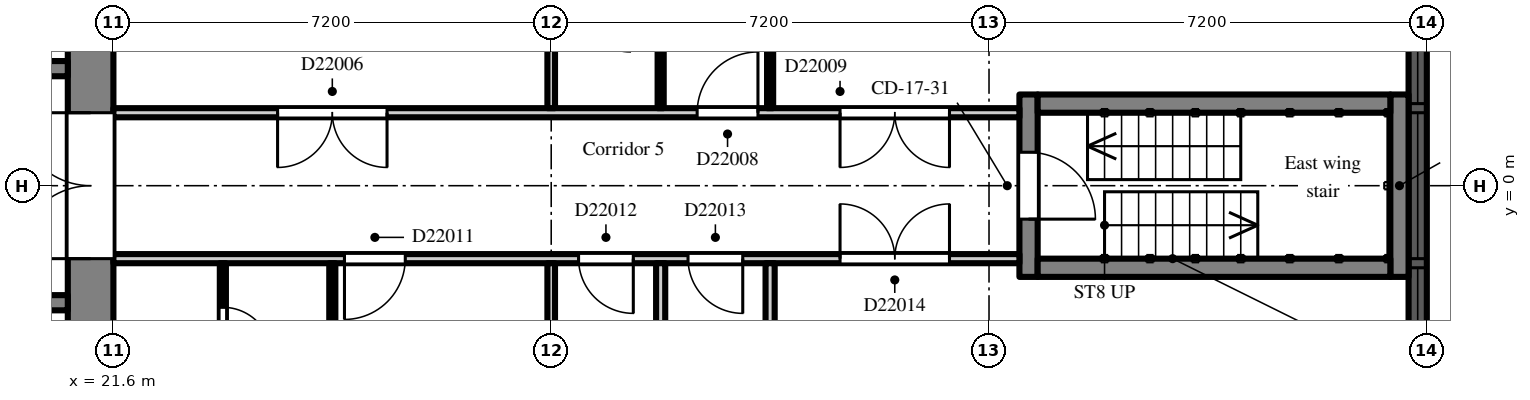
"""IFC4 building model, lengths in metres.
Left out: names, types, materials, properties, quantities, classifications, styles, units other than length and angle.
Written with IfcOpenShell. Run it as: python <this file> out.ifc"""

import sys

from ifc_helpers import new_model, si_unit, direction, frame, frame_2d, origin, place, context, subcontext, project, spatial, rectangle, extrude, element, fill, save


model = new_model("IFC4")
c1 = context("Model", 3, precision=1e-05, world=origin(), true_north=direction((0.0, 1.0)))
c2 = subcontext(c1, "Body", "Model", "MODEL_VIEW")
j1 = project(units=[si_unit("LENGTHUNIT", "METRE"), si_unit("PLANEANGLEUNIT", "RADIAN")], contexts=[c1])
p1 = place(None, origin())
s1 = spatial("IfcSite", under=j1, at=p1, CompositionType="ELEMENT")
p2 = place(p1, origin())
s2 = spatial("IfcBuilding", under=s1, at=p2, CompositionType="ELEMENT")
p3 = place(p2, frame((0.0, 0.0, 156.3)))
s3 = spatial("IfcBuildingStorey", under=s2, at=p3, CompositionType="ELEMENT", Elevation=156.3)
p4 = place(p3, frame((43.05, -2.7, 0.0), z_axis=(0.0, 0.0, 1.0), x_axis=(0.0, 1.0, 0.0)))
e1 = element("IfcWall", 1, at=p4, inside=s3, PredefinedType="SOLIDWALL", context=c2, shape_type="SweptSolid", body=[
    extrude(rectangle(XDim=5.4, YDim=0.3, at=frame_2d((2.7, 0.0))), origin(), (0.0, 0.0, 1.0), 2.2),
])
p5 = place(p4, frame((1.5, 0.0, 0.2)))
e2 = element("IfcOpeningElement", 2, at=p5, cuts=e1, PredefinedType="OPENING", context=c2, shape_type="SweptSolid", body=[
    extrude(rectangle(XDim=2.4, YDim=1.85, at=frame_2d((1.2, 0.925))), frame((0.0, 0.16, 0.0), z_axis=(0.0, -1.0, 0.0), x_axis=(1.0, 0.0, 0.0)), (0.0, 0.0, 1.0), 0.32),
])
p6 = place(p4, frame((0.15, 0.0, 0.2)))
e3 = element("IfcOpeningElement", 3, at=p6, cuts=e1, PredefinedType="OPENING", context=c2, shape_type="SweptSolid", body=[
    extrude(rectangle(XDim=1.2, YDim=1.85, at=frame_2d((0.6, 0.925))), frame((0.0, 0.16, 0.0), z_axis=(0.0, -1.0, 0.0), x_axis=(1.0, 0.0, 0.0)), (0.0, 0.0, 1.0), 0.32),
])
p7 = place(p4, frame((4.05, 0.0, 0.2)))
e4 = element("IfcOpeningElement", 4, at=p7, cuts=e1, PredefinedType="OPENING", context=c2, shape_type="SweptSolid", body=[
    extrude(rectangle(XDim=1.2, YDim=1.85, at=frame_2d((0.6, 0.925))), frame((0.0, 0.16, 0.0), z_axis=(0.0, -1.0, 0.0), x_axis=(1.0, 0.0, 0.0)), (0.0, 0.0, 1.0), 0.32),
])
p8 = place(p3, frame((21.225, -7.2, 0.0), z_axis=(0.0, 0.0, 1.0), x_axis=(0.0, 1.0, 0.0)))
e5 = element("IfcWall", 5, at=p8, inside=s3, PredefinedType="SHEAR", context=c2, shape_type="SweptSolid", body=[
    extrude(rectangle(XDim=14.4, YDim=0.75, at=frame_2d((7.2, 0.0))), origin(), (0.0, 0.0, 1.0), 2.6),
])
p9 = place(p8, frame((6.0, 0.0, 0.0)))
e6 = element("IfcOpeningElement", 6, at=p9, cuts=e5, PredefinedType="OPENING", context=c2, shape_type="SweptSolid", body=[
    extrude(rectangle(XDim=2.4, YDim=2.2, at=frame_2d((1.2, 1.1))), frame((0.0, 0.385, 0.0), z_axis=(0.0, -1.0, 0.0), x_axis=(1.0, 0.0, 0.0)), (0.0, 0.0, 1.0), 0.77),
])
p10 = place(p3, frame((7.9, 1.925, 0.0), z_axis=(0.0, 0.0, 1.0), x_axis=(1.0, 0.0, 0.0)))
e7 = element("IfcWall", 7, at=p10, inside=s3, PredefinedType="SHEAR", context=c2, shape_type="SweptSolid", body=[
    extrude(rectangle(XDim=12.95, YDim=0.25, at=frame_2d((6.475, 0.0))), origin(), (0.0, 0.0, 1.0), 2.6),
])
p11 = place(p10, frame((4.825, 0.0, 0.0)))
e8 = element("IfcOpeningElement", 8, at=p11, cuts=e7, PredefinedType="OPENING", context=c2, shape_type="SweptSolid", body=[
    extrude(rectangle(XDim=1.1, YDim=2.1, at=frame_2d((0.55, 1.05))), frame((0.0, 0.135, 0.0), z_axis=(0.0, -1.0, 0.0), x_axis=(1.0, 0.0, 0.0)), (0.0, 0.0, 1.0), 0.27),
])
p12 = place(p10, frame((7.025, 0.0, 0.0)))
e9 = element("IfcOpeningElement", 9, at=p12, cuts=e7, PredefinedType="OPENING", context=c2, shape_type="SweptSolid", body=[
    extrude(rectangle(XDim=1.1, YDim=2.1, at=frame_2d((0.55, 1.05))), frame((0.0, 0.135, 0.0), z_axis=(0.0, -1.0, 0.0), x_axis=(1.0, 0.0, 0.0)), (0.0, 0.0, 1.0), 0.27),
])
p13 = place(p10, frame((9.225, 0.0, 0.0)))
e10 = element("IfcOpeningElement", 10, at=p13, cuts=e7, PredefinedType="OPENING", context=c2, shape_type="SweptSolid", body=[
    extrude(rectangle(XDim=1.1, YDim=2.1, at=frame_2d((0.55, 1.05))), frame((0.0, 0.135, 0.0), z_axis=(0.0, -1.0, 0.0), x_axis=(1.0, 0.0, 0.0)), (0.0, 0.0, 1.0), 0.27),
])
p14 = place(p10, frame((0.525, 0.0, 0.0)))
e11 = element("IfcOpeningElement", 11, at=p14, cuts=e7, PredefinedType="OPENING", context=c2, shape_type="SweptSolid", body=[
    extrude(rectangle(XDim=0.9, YDim=2.1, at=frame_2d((0.45, 1.05))), frame((0.0, 0.135, 0.0), z_axis=(0.0, -1.0, 0.0), x_axis=(1.0, 0.0, 0.0)), (0.0, 0.0, 1.0), 0.27),
])
p15 = place(p10, frame((2.625, 0.0, 0.0)))
e12 = element("IfcOpeningElement", 12, at=p15, cuts=e7, PredefinedType="OPENING", context=c2, shape_type="SweptSolid", body=[
    extrude(rectangle(XDim=1.1, YDim=2.1, at=frame_2d((0.55, 1.05))), frame((0.0, 0.135, 0.0), z_axis=(0.0, -1.0, 0.0), x_axis=(1.0, 0.0, 0.0)), (0.0, 0.0, 1.0), 0.27),
])
p16 = place(p10, frame((11.525, 0.0, 0.0)))
e13 = element("IfcOpeningElement", 13, at=p16, cuts=e7, PredefinedType="OPENING", context=c2, shape_type="SweptSolid", body=[
    extrude(rectangle(XDim=0.9, YDim=2.1, at=frame_2d((0.45, 1.05))), frame((0.0, 0.135, 0.0), z_axis=(0.0, -1.0, 0.0), x_axis=(1.0, 0.0, 0.0)), (0.0, 0.0, 1.0), 0.27),
])
p17 = place(p3, frame((7.9, -1.925, 0.0), z_axis=(0.0, 0.0, 1.0), x_axis=(1.0, 0.0, 0.0)))
e14 = element("IfcWall", 14, at=p17, inside=s3, PredefinedType="SHEAR", context=c2, shape_type="SweptSolid", body=[
    extrude(rectangle(XDim=12.95, YDim=0.25, at=frame_2d((6.475, 0.0))), origin(), (0.0, 0.0, 1.0), 2.6),
])
p18 = place(p17, frame((0.525, 0.0, 0.0)))
e15 = element("IfcOpeningElement", 15, at=p18, cuts=e14, PredefinedType="OPENING", context=c2, shape_type="SweptSolid", body=[
    extrude(rectangle(XDim=0.9, YDim=2.1, at=frame_2d((0.45, 1.05))), frame((0.0, 0.135, 0.0), z_axis=(0.0, -1.0, 0.0), x_axis=(1.0, 0.0, 0.0)), (0.0, 0.0, 1.0), 0.27),
])
p19 = place(p17, frame((2.625, 0.0, 0.0)))
e16 = element("IfcOpeningElement", 16, at=p19, cuts=e14, PredefinedType="OPENING", context=c2, shape_type="SweptSolid", body=[
    extrude(rectangle(XDim=1.1, YDim=2.1, at=frame_2d((0.55, 1.05))), frame((0.0, 0.135, 0.0), z_axis=(0.0, -1.0, 0.0), x_axis=(1.0, 0.0, 0.0)), (0.0, 0.0, 1.0), 0.27),
])
p20 = place(p17, frame((8.225, 0.0, 0.0)))
e17 = element("IfcOpeningElement", 17, at=p20, cuts=e14, PredefinedType="OPENING", context=c2, shape_type="SweptSolid", body=[
    extrude(rectangle(XDim=0.9, YDim=2.1, at=frame_2d((0.45, 1.05))), frame((0.0, 0.135, 0.0), z_axis=(0.0, -1.0, 0.0), x_axis=(1.0, 0.0, 0.0)), (0.0, 0.0, 1.0), 0.27),
])
p21 = place(p3, frame((36.65, -1.5, 0.0), z_axis=(0.0, 0.0, 1.0), x_axis=(0.0, 1.0, 0.0)))
e18 = element("IfcWall", 18, at=p21, inside=s3, PredefinedType="SHEAR", context=c2, shape_type="SweptSolid", body=[
    extrude(rectangle(XDim=3.0, YDim=0.3, at=frame_2d((1.5, 0.0))), origin(), (0.0, 0.0, 1.0), 2.6),
])
p22 = place(p21, frame((0.95, 0.0, 0.0)))
e19 = element("IfcOpeningElement", 19, at=p22, cuts=e18, PredefinedType="OPENING", context=c2, shape_type="SweptSolid", body=[
    extrude(rectangle(XDim=1.1, YDim=2.1, at=frame_2d((0.55, 1.05))), frame((0.0, 0.16, 0.0), z_axis=(0.0, -1.0, 0.0), x_axis=(1.0, 0.0, 0.0)), (0.0, 0.0, 1.0), 0.32),
])
p23 = place(p3, frame((42.75, -1.5, 0.0), z_axis=(0.0, 0.0, 1.0), x_axis=(0.0, 1.0, 0.0)))
e20 = element("IfcWall", 20, at=p23, inside=s3, PredefinedType="SHEAR", context=c2, shape_type="SweptSolid", body=[
    extrude(rectangle(XDim=3.0, YDim=0.3, at=frame_2d((1.5, 0.0))), origin(), (0.0, 0.0, 1.0), 2.6),
])
for number, where, z_axis, x_axis in (
    (21, (36.8, -1.35, 0.0), (0.0, 0.0, 1.0), (1.0, 0.0, 0.0)),
    (22, (36.8, 1.35, 0.0), (0.0, 0.0, 1.0), (1.0, 0.0, 0.0)),
):
    element("IfcWall", number, at=place(p3, frame(where, z_axis=z_axis, x_axis=x_axis)), inside=s3, PredefinedType="SHEAR", context=c2, shape_type="SweptSolid", body=[
        extrude(rectangle(XDim=5.8, YDim=0.3, at=frame_2d((2.9, 0.0))), origin(), (0.0, 0.0, 1.0), 2.6),
    ])
p24 = place(p3, frame((21.6, -1.2, 0.0), z_axis=(0.0, 0.0, 1.0), x_axis=(1.0, 0.0, 0.0)))
e23 = element("IfcWall", 23, at=p24, inside=s3, PredefinedType="PARTITIONING", context=c2, shape_type="SweptSolid", body=[
    extrude(rectangle(XDim=14.9, YDim=0.15, at=frame_2d((7.45, 0.0))), origin(), (0.0, 0.0, 1.0), 2.6),
])
p25 = place(p24, frame((3.8, 0.0, 0.0)))
e24 = element("IfcOpeningElement", 24, at=p25, cuts=e23, PredefinedType="OPENING", context=c2, shape_type="SweptSolid", body=[
    extrude(rectangle(XDim=1.0, YDim=2.1, at=frame_2d((0.5, 1.05))), frame((0.0, 0.085, 0.0), z_axis=(0.0, -1.0, 0.0), x_axis=(1.0, 0.0, 0.0)), (0.0, 0.0, 1.0), 0.17),
])
p26 = place(p24, frame((7.65, 0.0, 0.0)))
e25 = element("IfcOpeningElement", 25, at=p26, cuts=e23, PredefinedType="OPENING", context=c2, shape_type="SweptSolid", body=[
    extrude(rectangle(XDim=0.9, YDim=2.1, at=frame_2d((0.45, 1.05))), frame((0.0, 0.085, 0.0), z_axis=(0.0, -1.0, 0.0), x_axis=(1.0, 0.0, 0.0)), (0.0, 0.0, 1.0), 0.17),
])
p27 = place(p24, frame((9.45, 0.0, 0.0)))
e26 = element("IfcOpeningElement", 26, at=p27, cuts=e23, PredefinedType="OPENING", context=c2, shape_type="SweptSolid", body=[
    extrude(rectangle(XDim=0.9, YDim=2.1, at=frame_2d((0.45, 1.05))), frame((0.0, 0.085, 0.0), z_axis=(0.0, -1.0, 0.0), x_axis=(1.0, 0.0, 0.0)), (0.0, 0.0, 1.0), 0.17),
])
p28 = place(p24, frame((11.95, 0.0, 0.0)))
e27 = element("IfcOpeningElement", 27, at=p28, cuts=e23, PredefinedType="OPENING", context=c2, shape_type="SweptSolid", body=[
    extrude(rectangle(XDim=1.8, YDim=2.1, at=frame_2d((0.9, 1.05))), frame((0.0, 0.085, 0.0), z_axis=(0.0, -1.0, 0.0), x_axis=(1.0, 0.0, 0.0)), (0.0, 0.0, 1.0), 0.17),
])
p29 = place(p3, frame((21.6, 1.2, 0.0), z_axis=(0.0, 0.0, 1.0), x_axis=(1.0, 0.0, 0.0)))
e28 = element("IfcWall", 28, at=p29, inside=s3, PredefinedType="PARTITIONING", context=c2, shape_type="SweptSolid", body=[
    extrude(rectangle(XDim=14.9, YDim=0.15, at=frame_2d((7.45, 0.0))), origin(), (0.0, 0.0, 1.0), 2.6),
])
p30 = place(p29, frame((2.7, 0.0, 0.0)))
e29 = element("IfcOpeningElement", 29, at=p30, cuts=e28, PredefinedType="OPENING", context=c2, shape_type="SweptSolid", body=[
    extrude(rectangle(XDim=1.8, YDim=2.1, at=frame_2d((0.9, 1.05))), frame((0.0, 0.085, 0.0), z_axis=(0.0, -1.0, 0.0), x_axis=(1.0, 0.0, 0.0)), (0.0, 0.0, 1.0), 0.17),
])
p31 = place(p29, frame((9.6, 0.0, 0.0)))
e30 = element("IfcOpeningElement", 30, at=p31, cuts=e28, PredefinedType="OPENING", context=c2, shape_type="SweptSolid", body=[
    extrude(rectangle(XDim=1.0, YDim=2.1, at=frame_2d((0.5, 1.05))), frame((0.0, 0.085, 0.0), z_axis=(0.0, -1.0, 0.0), x_axis=(1.0, 0.0, 0.0)), (0.0, 0.0, 1.0), 0.17),
])
p32 = place(p29, frame((11.95, 0.0, 0.0)))
e31 = element("IfcOpeningElement", 31, at=p32, cuts=e28, PredefinedType="OPENING", context=c2, shape_type="SweptSolid", body=[
    extrude(rectangle(XDim=1.8, YDim=2.1, at=frame_2d((0.9, 1.05))), frame((0.0, 0.085, 0.0), z_axis=(0.0, -1.0, 0.0), x_axis=(1.0, 0.0, 0.0)), (0.0, 0.0, 1.0), 0.17),
])
p33 = place(p3, frame((23.4, -3.65, 0.0), z_axis=(0.0, 0.0, 1.0), x_axis=(0.0, 1.0, 0.0)))
e32 = element("IfcWall", 32, at=p33, inside=s3, PredefinedType="PARTITIONING", context=c2, shape_type="SweptSolid", body=[
    extrude(rectangle(XDim=2.375, YDim=0.1, at=frame_2d((1.188, 0.0))), origin(), (0.0, 0.0, 1.0), 2.6),
])
p34 = place(p33, frame((0.85, 0.0, 0.0)))
e33 = element("IfcOpeningElement", 33, at=p34, cuts=e32, PredefinedType="OPENING", context=c2, shape_type="SweptSolid", body=[
    extrude(rectangle(XDim=0.8, YDim=2.1, at=frame_2d((0.4, 1.05))), frame((0.0, 0.06, 0.0), z_axis=(0.0, -1.0, 0.0), x_axis=(1.0, 0.0, 0.0)), (0.0, 0.0, 1.0), 0.12),
])
p35 = place(p3, frame((25.2, -3.55, 0.0), z_axis=(0.0, 0.0, 1.0), x_axis=(0.0, 1.0, 0.0)))
e34 = element("IfcWall", 34, at=p35, inside=s3, PredefinedType="PARTITIONING", context=c2, shape_type="SweptSolid", body=[
    extrude(rectangle(XDim=2.275, YDim=0.1, at=frame_2d((1.138, 0.0))), origin(), (0.0, 0.0, 1.0), 2.6),
])
p36 = place(p3, frame((28.8, -6.9, 0.0), z_axis=(0.0, 0.0, 1.0), x_axis=(0.0, 1.0, 0.0)))
e35 = element("IfcWall", 35, at=p36, inside=s3, PredefinedType="PARTITIONING", context=c2, shape_type="SweptSolid", body=[
    extrude(rectangle(XDim=5.625, YDim=0.125, at=frame_2d((2.812, 0.0))), origin(), (0.0, 0.0, 1.0), 2.6),
])
p37 = place(p3, frame((28.8, 1.275, 0.0), z_axis=(0.0, 0.0, 1.0), x_axis=(0.0, 1.0, 0.0)))
e36 = element("IfcWall", 36, at=p37, inside=s3, PredefinedType="PARTITIONING", context=c2, shape_type="SweptSolid", body=[
    extrude(rectangle(XDim=1.725, YDim=0.125, at=frame_2d((0.863, 0.0))), origin(), (0.0, 0.0, 1.0), 2.6),
])
p38 = place(p3, frame((30.6, -6.9, 0.0), z_axis=(0.0, 0.0, 1.0), x_axis=(0.0, 1.0, 0.0)))
e37 = element("IfcWall", 37, at=p38, inside=s3, PredefinedType="PARTITIONING", context=c2, shape_type="SweptSolid", body=[
    extrude(rectangle(XDim=5.625, YDim=0.15, at=frame_2d((2.812, 0.0))), origin(), (0.0, 0.0, 1.0), 2.6),
])
p39 = place(p3, frame((30.6, 1.275, 0.0), z_axis=(0.0, 0.0, 1.0), x_axis=(0.0, 1.0, 0.0)))
e38 = element("IfcWall", 38, at=p39, inside=s3, PredefinedType="PARTITIONING", context=c2, shape_type="SweptSolid", body=[
    extrude(rectangle(XDim=1.675, YDim=0.1, at=frame_2d((0.837, 0.0))), origin(), (0.0, 0.0, 1.0), 2.6),
])
p40 = place(p3, frame((32.4, -6.9, 0.0), z_axis=(0.0, 0.0, 1.0), x_axis=(0.0, 1.0, 0.0)))
e39 = element("IfcWall", 39, at=p40, inside=s3, PredefinedType="PARTITIONING", context=c2, shape_type="SweptSolid", body=[
    extrude(rectangle(XDim=5.625, YDim=0.15, at=frame_2d((2.812, 0.0))), origin(), (0.0, 0.0, 1.0), 2.6),
])
p41 = place(p3, frame((32.4, 1.275, 0.0), z_axis=(0.0, 0.0, 1.0), x_axis=(0.0, 1.0, 0.0)))
e40 = element("IfcWall", 40, at=p41, inside=s3, PredefinedType="PARTITIONING", context=c2, shape_type="SweptSolid", body=[
    extrude(rectangle(XDim=5.625, YDim=0.1, at=frame_2d((2.812, 0.0))), origin(), (0.0, 0.0, 1.0), 2.6),
])
p42 = place(p5, origin())
e41 = element("IfcWindow", 41, at=p42, inside=s3, PartitioningType="SINGLE_PANEL", PredefinedType="WINDOW", context=c2, shape_type="SweptSolid", body=[
    extrude(rectangle(XDim=2.4, YDim=1.85, at=frame_2d((1.2, 0.925))), frame((0.0, 0.03, 0.0), z_axis=(0.0, -1.0, 0.0), x_axis=(1.0, 0.0, 0.0)), (0.0, 0.0, 1.0), 0.06),
])
fill(e2, e41)
p43 = place(p6, origin())
e42 = element("IfcWindow", 42, at=p43, inside=s3, PartitioningType="SINGLE_PANEL", PredefinedType="WINDOW", context=c2, shape_type="SweptSolid", body=[
    extrude(rectangle(XDim=1.2, YDim=1.85, at=frame_2d((0.6, 0.925))), frame((0.0, 0.03, 0.0), z_axis=(0.0, -1.0, 0.0), x_axis=(1.0, 0.0, 0.0)), (0.0, 0.0, 1.0), 0.06),
])
fill(e3, e42)
p44 = place(p7, origin())
e43 = element("IfcWindow", 43, at=p44, inside=s3, PartitioningType="SINGLE_PANEL", PredefinedType="WINDOW", context=c2, shape_type="SweptSolid", body=[
    extrude(rectangle(XDim=1.2, YDim=1.85, at=frame_2d((0.6, 0.925))), frame((0.0, 0.03, 0.0), z_axis=(0.0, -1.0, 0.0), x_axis=(1.0, 0.0, 0.0)), (0.0, 0.0, 1.0), 0.06),
])
fill(e4, e43)
p45 = place(p9, origin())
e44 = element("IfcDoor", 44, at=p45, inside=s3, OperationType="DOUBLE_DOOR_DOUBLE_SWING", PredefinedType="DOOR", context=c2, shape_type="SweptSolid", body=[
    extrude(rectangle(XDim=2.4, YDim=2.2, at=frame_2d((1.2, 1.1))), frame((0.0, 0.025, 0.0), z_axis=(0.0, -1.0, 0.0), x_axis=(1.0, 0.0, 0.0)), (0.0, 0.0, 1.0), 0.05),
])
fill(e6, e44)
p46 = place(p22, frame((1.1, 0.0, 0.0), z_axis=(0.0, 0.0, 1.0), x_axis=(-1.0, 0.0, 0.0)))
e45 = element("IfcDoor", 45, at=p46, inside=s3, OperationType="SINGLE_SWING_RIGHT", PredefinedType="DOOR", context=c2, shape_type="SweptSolid", body=[
    extrude(rectangle(XDim=1.1, YDim=2.1, at=frame_2d((0.55, 1.05))), frame((0.0, 0.025, 0.0), z_axis=(0.0, -1.0, 0.0), x_axis=(1.0, 0.0, 0.0)), (0.0, 0.0, 1.0), 0.05),
])
fill(e19, e45)
p47 = place(p30, frame((1.8, 0.0, 0.0), z_axis=(0.0, 0.0, 1.0), x_axis=(-1.0, 0.0, 0.0)))
e46 = element("IfcDoor", 46, at=p47, inside=s3, OperationType="DOUBLE_DOOR_DOUBLE_SWING", PredefinedType="DOOR", context=c2, shape_type="SweptSolid", body=[
    extrude(rectangle(XDim=1.8, YDim=2.1, at=frame_2d((0.9, 1.05))), frame((0.0, 0.025, 0.0), z_axis=(0.0, -1.0, 0.0), x_axis=(1.0, 0.0, 0.0)), (0.0, 0.0, 1.0), 0.05),
])
fill(e29, e46)
p48 = place(p31, origin())
e47 = element("IfcDoor", 47, at=p48, inside=s3, OperationType="SINGLE_SWING_RIGHT", PredefinedType="DOOR", context=c2, shape_type="SweptSolid", body=[
    extrude(rectangle(XDim=1.0, YDim=2.1, at=frame_2d((0.5, 1.05))), frame((0.0, 0.025, 0.0), z_axis=(0.0, -1.0, 0.0), x_axis=(1.0, 0.0, 0.0)), (0.0, 0.0, 1.0), 0.05),
])
fill(e30, e47)
p49 = place(p32, frame((1.8, 0.0, 0.0), z_axis=(0.0, 0.0, 1.0), x_axis=(-1.0, 0.0, 0.0)))
e48 = element("IfcDoor", 48, at=p49, inside=s3, OperationType="DOUBLE_DOOR_DOUBLE_SWING", PredefinedType="DOOR", context=c2, shape_type="SweptSolid", body=[
    extrude(rectangle(XDim=1.8, YDim=2.1, at=frame_2d((0.9, 1.05))), frame((0.0, 0.025, 0.0), z_axis=(0.0, -1.0, 0.0), x_axis=(1.0, 0.0, 0.0)), (0.0, 0.0, 1.0), 0.05),
])
fill(e31, e48)
p50 = place(p34, frame((0.8, 0.0, 0.0), z_axis=(0.0, 0.0, 1.0), x_axis=(-1.0, 0.0, 0.0)))
e49 = element("IfcDoor", 49, at=p50, inside=s3, OperationType="SINGLE_SWING_RIGHT", PredefinedType="DOOR", context=c2, shape_type="SweptSolid", body=[
    extrude(rectangle(XDim=0.8, YDim=2.1, at=frame_2d((0.4, 1.05))), frame((0.0, 0.025, 0.0), z_axis=(0.0, -1.0, 0.0), x_axis=(1.0, 0.0, 0.0)), (0.0, 0.0, 1.0), 0.05),
])
fill(e33, e49)
p51 = place(p25, frame((1.0, 0.0, 0.0), z_axis=(0.0, 0.0, 1.0), x_axis=(-1.0, 0.0, 0.0)))
e50 = element("IfcDoor", 50, at=p51, inside=s3, OperationType="SINGLE_SWING_RIGHT", PredefinedType="DOOR", context=c2, shape_type="SweptSolid", body=[
    extrude(rectangle(XDim=1.0, YDim=2.1, at=frame_2d((0.5, 1.05))), frame((0.0, 0.025, 0.0), z_axis=(0.0, -1.0, 0.0), x_axis=(1.0, 0.0, 0.0)), (0.0, 0.0, 1.0), 0.05),
])
fill(e24, e50)
p52 = place(p26, frame((0.9, 0.0, 0.0), z_axis=(0.0, 0.0, 1.0), x_axis=(-1.0, 0.0, 0.0)))
e51 = element("IfcDoor", 51, at=p52, inside=s3, OperationType="SINGLE_SWING_LEFT", PredefinedType="DOOR", context=c2, shape_type="SweptSolid", body=[
    extrude(rectangle(XDim=0.9, YDim=2.1, at=frame_2d((0.45, 1.05))), frame((0.0, 0.025, 0.0), z_axis=(0.0, -1.0, 0.0), x_axis=(1.0, 0.0, 0.0)), (0.0, 0.0, 1.0), 0.05),
])
fill(e25, e51)
p53 = place(p27, frame((0.9, 0.0, 0.0), z_axis=(0.0, 0.0, 1.0), x_axis=(-1.0, 0.0, 0.0)))
e52 = element("IfcDoor", 52, at=p53, inside=s3, OperationType="SINGLE_SWING_LEFT", PredefinedType="DOOR", context=c2, shape_type="SweptSolid", body=[
    extrude(rectangle(XDim=0.9, YDim=2.1, at=frame_2d((0.45, 1.05))), frame((0.0, 0.025, 0.0), z_axis=(0.0, -1.0, 0.0), x_axis=(1.0, 0.0, 0.0)), (0.0, 0.0, 1.0), 0.05),
])
fill(e26, e52)
p54 = place(p28, origin())
e53 = element("IfcDoor", 53, at=p54, inside=s3, OperationType="DOUBLE_DOOR_DOUBLE_SWING", PredefinedType="DOOR", context=c2, shape_type="SweptSolid", body=[
    extrude(rectangle(XDim=1.8, YDim=2.1, at=frame_2d((0.9, 1.05))), frame((0.0, 0.025, 0.0), z_axis=(0.0, -1.0, 0.0), x_axis=(1.0, 0.0, 0.0)), (0.0, 0.0, 1.0), 0.05),
])
fill(e27, e53)
save(model, sys.argv[1])
